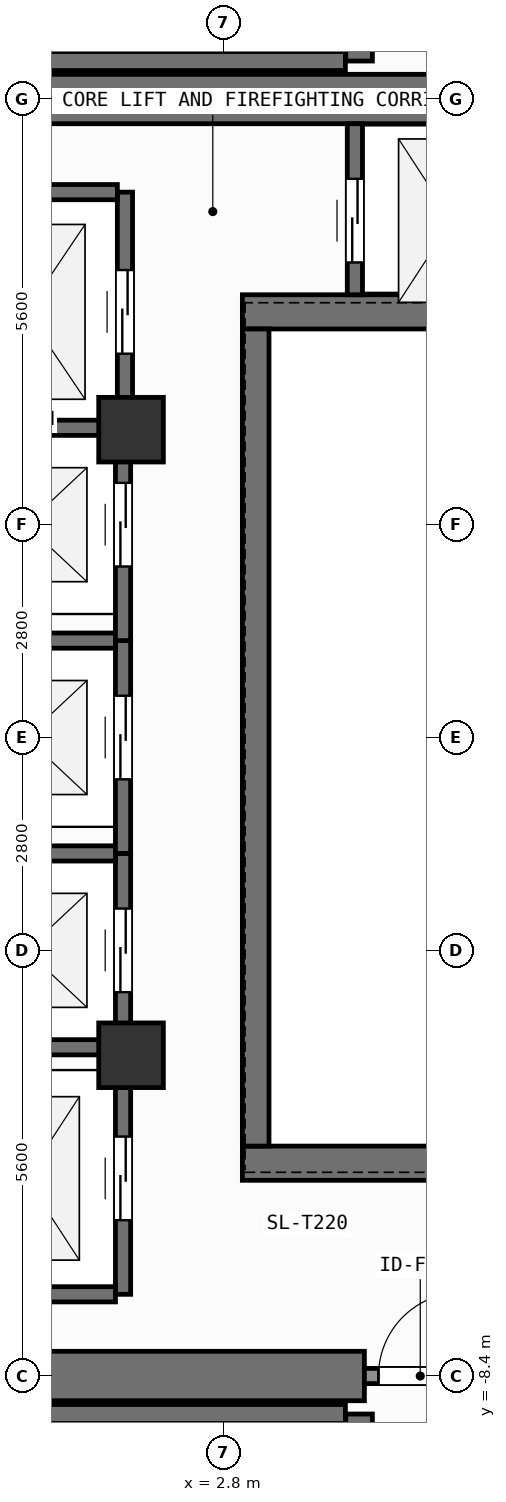
"""IFC4 building model, lengths in metres.
Left out: names, types, materials, properties, quantities, classifications, styles, units other than length and angle.
Written with IfcOpenShell. Run it as: python <this file> out.ifc"""

import sys

from ifc_helpers import new_model, si_unit, direction, frame, frame_2d, origin, origin_2d, place, context, subcontext, project, spatial, rectangle, extrude, element, fill, save


model = new_model("IFC4")
c1 = context("Model", 3, precision=1e-05, world=origin(), true_north=direction((0.0, 1.0)))
c2 = subcontext(c1, "Body", "Model", "MODEL_VIEW")
j1 = project(units=[si_unit("LENGTHUNIT", "METRE"), si_unit("PLANEANGLEUNIT", "RADIAN")], contexts=[c1])
p1 = place(None, origin())
s1 = spatial("IfcSite", under=j1, at=p1, CompositionType="ELEMENT")
p2 = place(p1, origin())
s2 = spatial("IfcBuilding", under=s1, at=p2, CompositionType="ELEMENT")
p3 = place(p2, frame((0.0, 0.0, 246.9)))
s3 = spatial("IfcBuildingStorey", under=s2, at=p3, CompositionType="ELEMENT", Elevation=246.9)
p4 = place(p3, frame((-2.62, -8.4, 0.0), z_axis=(0.0, 0.0, 1.0), x_axis=(1.0, 0.0, 0.0)))
e1 = element("IfcWall", 1, at=p4, inside=s3, PredefinedType="SHEAR", context=c2, shape_type="SweptSolid", body=[
    extrude(rectangle(XDim=7.27, YDim=0.65, at=frame_2d((3.635, 0.0))), origin(), (0.0, 0.0, 1.0), 3.9),
])
p5 = place(p3, frame((-7.55, 8.4, 0.0), z_axis=(0.0, 0.0, 1.0), x_axis=(1.0, 0.0, 0.0)))
e2 = element("IfcWall", 2, at=p5, inside=s3, PredefinedType="SHEAR", context=c2, shape_type="SweptSolid", body=[
    extrude(rectangle(XDim=16.275, YDim=0.65, at=frame_2d((8.138, 0.0))), origin(), (0.0, 0.0, 1.0), 3.9),
])
for number, where, z_axis, x_axis in (
    (3, (3.045, -5.6, 0.0), (0.0, 0.0, 1.0), (1.0, 0.0, 0.0)),
    (4, (3.045, 5.6, 0.0), (0.0, 0.0, 1.0), (1.0, 0.0, 0.0)),
):
    element("IfcWall", number, at=place(p3, frame(where, z_axis=z_axis, x_axis=x_axis)), inside=s3, PredefinedType="SHEAR", context=c2, shape_type="SweptSolid", body=[
        extrude(rectangle(XDim=5.68, YDim=0.45, at=frame_2d((2.84, 0.0))), origin(), (0.0, 0.0, 1.0), 3.9),
    ])
p6 = place(p3, frame((3.22, -5.375, 0.0), z_axis=(0.0, 0.0, 1.0), x_axis=(0.0, 1.0, 0.0)))
e5 = element("IfcWall", 5, at=p6, inside=s3, PredefinedType="SHEAR", context=c2, shape_type="SweptSolid", body=[
    extrude(rectangle(XDim=10.75, YDim=0.35, at=frame_2d((5.375, 0.0))), origin(), (0.0, 0.0, 1.0), 3.9),
])
p7 = place(p3, frame((-2.2, -8.9, 0.0), z_axis=(0.0, 0.0, 1.0), x_axis=(1.0, 0.0, 0.0)))
e6 = element("IfcWall", 6, at=p7, inside=s3, PredefinedType="SHEAR", context=c2, shape_type="SweptSolid", body=[
    extrude(rectangle(XDim=6.6, YDim=0.25, at=frame_2d((3.3, 0.0))), origin(), (0.0, 0.0, 1.0), 3.9),
])
p8 = place(p3, frame((4.58, -8.9, 0.0), z_axis=(0.0, 0.0, 1.0), x_axis=(0.0, -1.0, 0.0)))
e7 = element("IfcWall", 7, at=p8, inside=s3, PredefinedType="SHEAR", context=c2, shape_type="SweptSolid", body=[
    extrude(rectangle(XDim=2.925, YDim=0.35, at=frame_2d((1.462, 0.0))), origin(), (0.0, 0.0, 1.0), 3.9),
])
p9 = place(p8, frame((0.913, 0.0, 0.0)))
e8 = element("IfcOpeningElement", 8, at=p9, cuts=e7, PredefinedType="OPENING", context=c2, shape_type="SweptSolid", body=[
    extrude(rectangle(XDim=1.1, YDim=2.15, at=frame_2d((0.55, 1.075))), frame((0.0, 0.185, 0.0), z_axis=(0.0, -1.0, 0.0), x_axis=(1.0, 0.0, 0.0)), (0.0, 0.0, 1.0), 0.37),
])
p10 = place(p3, frame((-2.2, 8.9, 0.0), z_axis=(0.0, 0.0, 1.0), x_axis=(1.0, 0.0, 0.0)))
e9 = element("IfcWall", 9, at=p10, inside=s3, PredefinedType="SHEAR", context=c2, shape_type="SweptSolid", body=[
    extrude(rectangle(XDim=6.6, YDim=0.25, at=frame_2d((3.3, 0.0))), origin(), (0.0, 0.0, 1.0), 3.9),
])
p11 = place(p3, frame((4.58, 11.825, 0.0), z_axis=(0.0, 0.0, 1.0), x_axis=(0.0, -1.0, 0.0)))
e10 = element("IfcWall", 10, at=p11, inside=s3, PredefinedType="SHEAR", context=c2, shape_type="SweptSolid", body=[
    extrude(rectangle(XDim=2.925, YDim=0.35, at=frame_2d((1.462, 0.0))), origin(), (0.0, 0.0, 1.0), 3.9),
])
p12 = place(p11, frame((0.913, 0.0, 0.0)))
e11 = element("IfcOpeningElement", 11, at=p12, cuts=e10, PredefinedType="OPENING", context=c2, shape_type="SweptSolid", body=[
    extrude(rectangle(XDim=1.1, YDim=2.15, at=frame_2d((0.55, 1.075))), frame((0.0, 0.185, 0.0), z_axis=(0.0, -1.0, 0.0), x_axis=(1.0, 0.0, 0.0)), (0.0, 0.0, 1.0), 0.37),
])
for number, where, z_axis, x_axis in (
    (12, (1.58, -4.18, 0.0), (0.0, 0.0, 1.0), (1.0, 0.0, 0.0)),
    (13, (1.58, 4.05, 0.0), (0.0, 0.0, 1.0), (1.0, 0.0, 0.0)),
):
    element("IfcColumn", number, at=place(p3, frame(where, z_axis=z_axis, x_axis=x_axis)), inside=s3, PredefinedType="COLUMN", context=c2, shape_type="SweptSolid", body=[
        extrude(rectangle(XDim=0.85, YDim=0.85, at=origin_2d()), origin(), (0.0, 0.0, 1.0), 3.9),
    ])
p13 = place(p3, frame((1.475, -4.275, 0.0), z_axis=(0.0, 0.0, 1.0), x_axis=(0.0, 1.0, 0.0)))
e14 = element("IfcWall", 14, at=p13, inside=s3, PredefinedType="SHEAR", context=c2, shape_type="SweptSolid", body=[
    extrude(rectangle(XDim=2.75, YDim=0.2, at=frame_2d((1.375, 0.0))), origin(), (0.0, 0.0, 1.0), 3.68),
])
p14 = place(p13, frame((0.925, 0.0, 0.0)))
e15 = element("IfcOpeningElement", 15, at=p14, cuts=e14, PredefinedType="OPENING", context=c2, shape_type="SweptSolid", body=[
    extrude(rectangle(XDim=1.1, YDim=2.2, at=frame_2d((0.55, 1.1))), frame((0.0, 0.11, 0.0), z_axis=(0.0, -1.0, 0.0), x_axis=(1.0, 0.0, 0.0)), (0.0, 0.0, 1.0), 0.22),
])
for number, where, z_axis, x_axis in (
    (16, (-0.975, -4.075, 0.0), (0.0, 0.0, 1.0), (1.0, 0.0, 0.0)),
    (17, (-0.975, -1.525, 0.0), (0.0, 0.0, 1.0), (1.0, 0.0, 0.0)),
):
    element("IfcWall", number, at=place(p3, frame(where, z_axis=z_axis, x_axis=x_axis)), inside=s3, PredefinedType="SHEAR", context=c2, shape_type="SweptSolid", body=[
        extrude(rectangle(XDim=2.35, YDim=0.2, at=frame_2d((1.175, 0.0))), origin(), (0.0, 0.0, 1.0), 3.68),
    ])
p15 = place(p3, frame((1.475, -1.525, 0.0), z_axis=(0.0, 0.0, 1.0), x_axis=(0.0, 1.0, 0.0)))
e18 = element("IfcWall", 18, at=p15, inside=s3, PredefinedType="SHEAR", context=c2, shape_type="SweptSolid", body=[
    extrude(rectangle(XDim=2.8, YDim=0.2, at=frame_2d((1.4, 0.0))), origin(), (0.0, 0.0, 1.0), 3.68),
])
p16 = place(p15, frame((0.975, 0.0, 0.0)))
e19 = element("IfcOpeningElement", 19, at=p16, cuts=e18, PredefinedType="OPENING", context=c2, shape_type="SweptSolid", body=[
    extrude(rectangle(XDim=1.1, YDim=2.2, at=frame_2d((0.55, 1.1))), frame((0.0, 0.11, 0.0), z_axis=(0.0, -1.0, 0.0), x_axis=(1.0, 0.0, 0.0)), (0.0, 0.0, 1.0), 0.22),
])
p17 = place(p3, frame((-0.975, 1.275, 0.0), z_axis=(0.0, 0.0, 1.0), x_axis=(1.0, 0.0, 0.0)))
e20 = element("IfcWall", 20, at=p17, inside=s3, PredefinedType="SHEAR", context=c2, shape_type="SweptSolid", body=[
    extrude(rectangle(XDim=2.35, YDim=0.2, at=frame_2d((1.175, 0.0))), origin(), (0.0, 0.0, 1.0), 3.68),
])
p18 = place(p3, frame((1.475, 1.275, 0.0), z_axis=(0.0, 0.0, 1.0), x_axis=(0.0, 1.0, 0.0)))
e21 = element("IfcWall", 21, at=p18, inside=s3, PredefinedType="SHEAR", context=c2, shape_type="SweptSolid", body=[
    extrude(rectangle(XDim=2.8, YDim=0.2, at=frame_2d((1.4, 0.0))), origin(), (0.0, 0.0, 1.0), 3.68),
])
p19 = place(p18, frame((0.975, 0.0, 0.0)))
e22 = element("IfcOpeningElement", 22, at=p19, cuts=e21, PredefinedType="OPENING", context=c2, shape_type="SweptSolid", body=[
    extrude(rectangle(XDim=1.1, YDim=2.2, at=frame_2d((0.55, 1.1))), frame((0.0, 0.11, 0.0), z_axis=(0.0, -1.0, 0.0), x_axis=(1.0, 0.0, 0.0)), (0.0, 0.0, 1.0), 0.22),
])
p20 = place(p3, frame((-0.975, 4.075, 0.0), z_axis=(0.0, 0.0, 1.0), x_axis=(1.0, 0.0, 0.0)))
e23 = element("IfcWall", 23, at=p20, inside=s3, PredefinedType="SHEAR", context=c2, shape_type="SweptSolid", body=[
    extrude(rectangle(XDim=2.35, YDim=0.2, at=frame_2d((1.175, 0.0))), origin(), (0.0, 0.0, 1.0), 3.68),
])
p21 = place(p3, frame((1.5, 4.025, 0.0), z_axis=(0.0, 0.0, 1.0), x_axis=(0.0, 1.0, 0.0)))
e24 = element("IfcWall", 24, at=p21, inside=s3, PredefinedType="SHEAR", context=c2, shape_type="SweptSolid", body=[
    extrude(rectangle(XDim=3.15, YDim=0.2, at=frame_2d((1.575, 0.0))), origin(), (0.0, 0.0, 1.0), 3.68),
])
p22 = place(p21, frame((1.025, 0.0, 0.0)))
e25 = element("IfcOpeningElement", 25, at=p22, cuts=e24, PredefinedType="OPENING", context=c2, shape_type="SweptSolid", body=[
    extrude(rectangle(XDim=1.1, YDim=2.2, at=frame_2d((0.55, 1.1))), frame((0.0, 0.11, 0.0), z_axis=(0.0, -1.0, 0.0), x_axis=(1.0, 0.0, 0.0)), (0.0, 0.0, 1.0), 0.22),
])
p23 = place(p3, frame((-1.0, 7.175, 0.0), z_axis=(0.0, 0.0, 1.0), x_axis=(1.0, 0.0, 0.0)))
e26 = element("IfcWall", 26, at=p23, inside=s3, PredefinedType="SHEAR", context=c2, shape_type="SweptSolid", body=[
    extrude(rectangle(XDim=2.4, YDim=0.2, at=frame_2d((1.2, 0.0))), origin(), (0.0, 0.0, 1.0), 3.68),
])
p24 = place(p3, frame((1.475, -7.325, 0.0), z_axis=(0.0, 0.0, 1.0), x_axis=(0.0, 1.0, 0.0)))
e27 = element("IfcWall", 27, at=p24, inside=s3, PredefinedType="SHEAR", context=c2, shape_type="SweptSolid", body=[
    extrude(rectangle(XDim=3.05, YDim=0.2, at=frame_2d((1.525, 0.0))), origin(), (0.0, 0.0, 1.0), 3.68),
])
p25 = place(p24, frame((0.975, 0.0, 0.0)))
e28 = element("IfcOpeningElement", 28, at=p25, cuts=e27, PredefinedType="OPENING", context=c2, shape_type="SweptSolid", body=[
    extrude(rectangle(XDim=1.1, YDim=2.2, at=frame_2d((0.55, 1.1))), frame((0.0, 0.11, 0.0), z_axis=(0.0, -1.0, 0.0), x_axis=(1.0, 0.0, 0.0)), (0.0, 0.0, 1.0), 0.22),
])
p26 = place(p3, frame((-0.975, -7.325, 0.0), z_axis=(0.0, 0.0, 1.0), x_axis=(1.0, 0.0, 0.0)))
e29 = element("IfcWall", 29, at=p26, inside=s3, PredefinedType="SHEAR", context=c2, shape_type="SweptSolid", body=[
    extrude(rectangle(XDim=2.35, YDim=0.2, at=frame_2d((1.175, 0.0))), origin(), (0.0, 0.0, 1.0), 3.68),
])
p27 = place(p3, frame((4.525, 5.825, 0.0), z_axis=(0.0, 0.0, 1.0), x_axis=(0.0, 1.0, 0.0)))
e30 = element("IfcWall", 30, at=p27, inside=s3, PredefinedType="SHEAR", context=c2, shape_type="SweptSolid", body=[
    extrude(rectangle(XDim=2.25, YDim=0.2, at=frame_2d((1.125, 0.0))), origin(), (0.0, 0.0, 1.0), 3.68),
])
p28 = place(p27, frame((0.425, 0.0, 0.0)))
e31 = element("IfcOpeningElement", 31, at=p28, cuts=e30, PredefinedType="OPENING", context=c2, shape_type="SweptSolid", body=[
    extrude(rectangle(XDim=1.1, YDim=2.2, at=frame_2d((0.55, 1.1))), frame((0.0, 0.11, 0.0), z_axis=(0.0, -1.0, 0.0), x_axis=(1.0, 0.0, 0.0)), (0.0, 0.0, 1.0), 0.22),
])
p29 = place(p3, frame((4.65, -8.4, 0.0), z_axis=(0.0, 0.0, 1.0), x_axis=(1.0, 0.0, 0.0)))
e32 = element("IfcWall", 32, at=p29, inside=s3, PredefinedType="SOLIDWALL", context=c2, shape_type="SweptSolid", body=[
    extrude(rectangle(XDim=1.47, YDim=0.2, at=frame_2d((0.735, 0.0))), origin(), (0.0, 0.0, 1.0), 2.92),
])
p30 = place(p29, frame((0.185, 0.0, 0.0)))
e33 = element("IfcOpeningElement", 33, at=p30, cuts=e32, PredefinedType="OPENING", context=c2, shape_type="SweptSolid", body=[
    extrude(rectangle(XDim=1.1, YDim=2.15, at=frame_2d((0.55, 1.075))), frame((0.0, 0.11, 0.0), z_axis=(0.0, -1.0, 0.0), x_axis=(1.0, 0.0, 0.0)), (0.0, 0.0, 1.0), 0.22),
])
p31 = place(p14, origin())
e34 = element("IfcDoor", 34, at=p31, inside=s3, OperationType="SLIDING_TO_LEFT", PredefinedType="DOOR", context=c2, shape_type="SweptSolid", body=[
    extrude(rectangle(XDim=1.1, YDim=2.2, at=frame_2d((0.55, 1.1))), frame((0.0, 0.025, 0.0), z_axis=(0.0, -1.0, 0.0), x_axis=(1.0, 0.0, 0.0)), (0.0, 0.0, 1.0), 0.05),
])
fill(e15, e34)
p32 = place(p16, origin())
e35 = element("IfcDoor", 35, at=p32, inside=s3, OperationType="SLIDING_TO_LEFT", PredefinedType="DOOR", context=c2, shape_type="SweptSolid", body=[
    extrude(rectangle(XDim=1.1, YDim=2.2, at=frame_2d((0.55, 1.1))), frame((0.0, 0.025, 0.0), z_axis=(0.0, -1.0, 0.0), x_axis=(1.0, 0.0, 0.0)), (0.0, 0.0, 1.0), 0.05),
])
fill(e19, e35)
p33 = place(p19, origin())
e36 = element("IfcDoor", 36, at=p33, inside=s3, OperationType="SLIDING_TO_LEFT", PredefinedType="DOOR", context=c2, shape_type="SweptSolid", body=[
    extrude(rectangle(XDim=1.1, YDim=2.2, at=frame_2d((0.55, 1.1))), frame((0.0, 0.025, 0.0), z_axis=(0.0, -1.0, 0.0), x_axis=(1.0, 0.0, 0.0)), (0.0, 0.0, 1.0), 0.05),
])
fill(e22, e36)
p34 = place(p22, origin())
e37 = element("IfcDoor", 37, at=p34, inside=s3, OperationType="SLIDING_TO_LEFT", PredefinedType="DOOR", context=c2, shape_type="SweptSolid", body=[
    extrude(rectangle(XDim=1.1, YDim=2.2, at=frame_2d((0.55, 1.1))), frame((0.0, 0.025, 0.0), z_axis=(0.0, -1.0, 0.0), x_axis=(1.0, 0.0, 0.0)), (0.0, 0.0, 1.0), 0.05),
])
fill(e25, e37)
p35 = place(p25, origin())
e38 = element("IfcDoor", 38, at=p35, inside=s3, OperationType="SLIDING_TO_LEFT", PredefinedType="DOOR", context=c2, shape_type="SweptSolid", body=[
    extrude(rectangle(XDim=1.1, YDim=2.2, at=frame_2d((0.55, 1.1))), frame((0.0, 0.025, 0.0), z_axis=(0.0, -1.0, 0.0), x_axis=(1.0, 0.0, 0.0)), (0.0, 0.0, 1.0), 0.05),
])
fill(e28, e38)
p36 = place(p28, origin())
e39 = element("IfcDoor", 39, at=p36, inside=s3, OperationType="SLIDING_TO_LEFT", PredefinedType="DOOR", context=c2, shape_type="SweptSolid", body=[
    extrude(rectangle(XDim=1.1, YDim=2.2, at=frame_2d((0.55, 1.1))), frame((0.0, 0.025, 0.0), z_axis=(0.0, -1.0, 0.0), x_axis=(1.0, 0.0, 0.0)), (0.0, 0.0, 1.0), 0.05),
])
fill(e31, e39)
p37 = place(p30, origin())
e40 = element("IfcDoor", 40, at=p37, inside=s3, OperationType="SINGLE_SWING_RIGHT", PredefinedType="DOOR", context=c2, shape_type="SweptSolid", body=[
    extrude(rectangle(XDim=1.1, YDim=2.15, at=frame_2d((0.55, 1.075))), frame((0.0, 0.025, 0.0), z_axis=(0.0, -1.0, 0.0), x_axis=(1.0, 0.0, 0.0)), (0.0, 0.0, 1.0), 0.05),
])
fill(e33, e40)
save(model, sys.argv[1])
